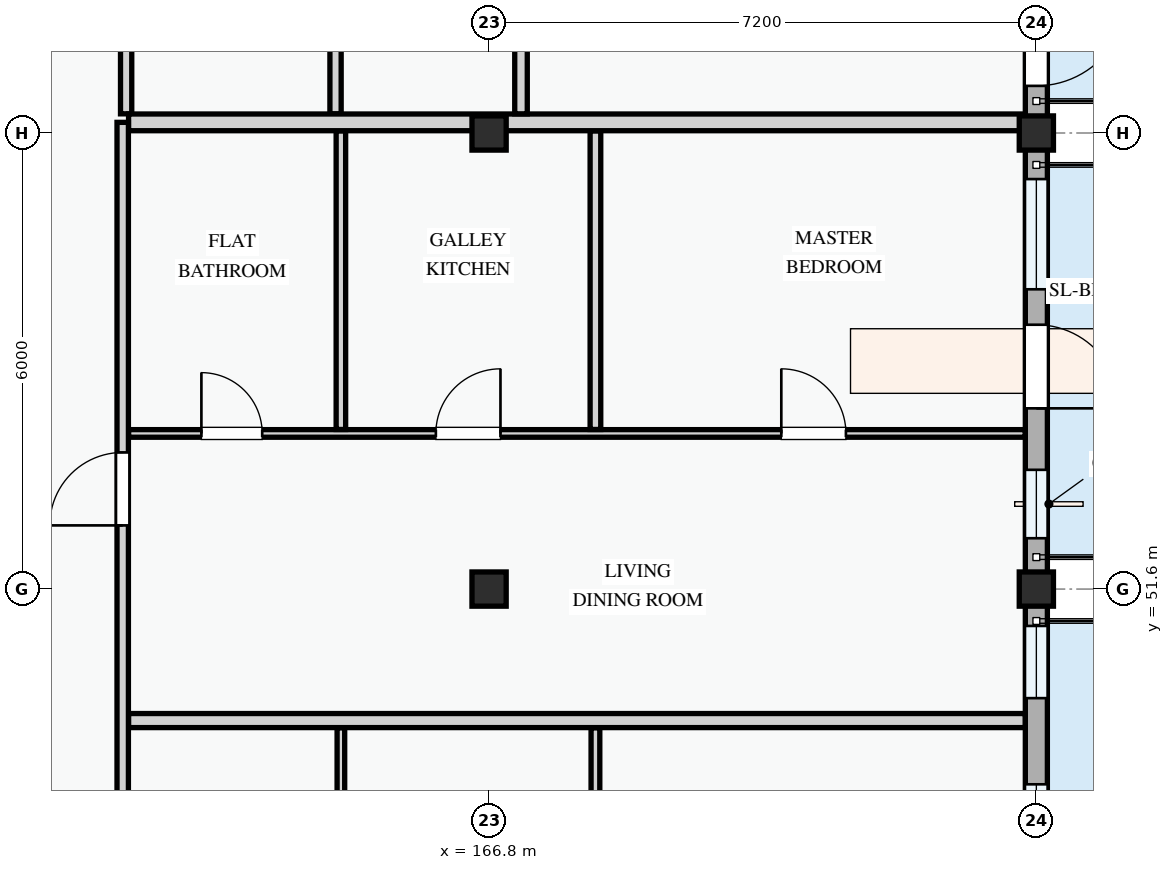
"""IFC4 building model, lengths in metres.
Left out: names, types, materials, properties, quantities, classifications, styles, units other than length and angle.
Written with IfcOpenShell. Run it as: python <this file> out.ifc"""

import sys

from ifc_helpers import new_model, si_unit, direction, frame, frame_2d, origin, origin_2d, place, context, subcontext, project, spatial, rectangle, extrude, element, fill, save


model = new_model("IFC4")
c1 = context("Model", 3, precision=1e-05, world=origin(), true_north=direction((0.0, 1.0)))
c2 = subcontext(c1, "Body", "Model", "MODEL_VIEW")
j1 = project(units=[si_unit("LENGTHUNIT", "METRE"), si_unit("PLANEANGLEUNIT", "RADIAN")], contexts=[c1])
p1 = place(None, origin())
s1 = spatial("IfcSite", under=j1, at=p1, CompositionType="ELEMENT")
p2 = place(p1, origin())
s2 = spatial("IfcBuilding", under=s1, at=p2, CompositionType="ELEMENT")
p3 = place(p2, frame((0.0, 0.0, 18.0)))
s3 = spatial("IfcBuildingStorey", under=s2, at=p3, CompositionType="ELEMENT", Elevation=18.0)
for number, where, z_axis, x_axis in (
    (1, (166.8, 51.6, 0.0), (0.0, 0.0, 1.0), (1.0, 0.0, 0.0)),
    (2, (166.8, 57.6, 0.0), (0.0, 0.0, 1.0), (1.0, 0.0, 0.0)),
    (3, (174.0, 51.6, 0.0), (0.0, 0.0, 1.0), (1.0, 0.0, 0.0)),
    (4, (174.0, 57.6, 0.0), (0.0, 0.0, 1.0), (1.0, 0.0, 0.0)),
):
    element("IfcColumn", number, at=place(p3, frame(where, z_axis=z_axis, x_axis=x_axis)), inside=s3, PredefinedType="COLUMN", context=c2, shape_type="SweptSolid", body=[
        extrude(rectangle(XDim=0.45, YDim=0.45, at=origin_2d()), origin(), (0.0, 0.0, 1.0), 3.3),
    ])
p4 = place(p3, frame((174.0, 43.2, 0.0), z_axis=(0.0, 0.0, 1.0), x_axis=(0.0, 1.0, 0.0)))
e5 = element("IfcWall", 5, at=p4, inside=s3, PredefinedType="STANDARD", context=c2, shape_type="SweptSolid", body=[
    extrude(rectangle(XDim=8.4, YDim=0.29, at=frame_2d((4.2, 0.0))), origin(), (0.0, 0.0, 1.0), 2.425),
])
p5 = place(p4, frame((2.143, 0.0, 0.0)))
e6 = element("IfcOpeningElement", 6, at=p5, cuts=e5, PredefinedType="OPENING", context=c2, shape_type="SweptSolid", body=[
    extrude(rectangle(XDim=1.05, YDim=2.15, at=frame_2d((0.525, 1.075))), frame((0.0, 0.155, 0.0), z_axis=(0.0, -1.0, 0.0), x_axis=(1.0, 0.0, 0.0)), (0.0, 0.0, 1.0), 0.31),
])
p6 = place(p4, frame((0.501, 0.0, 0.78)))
e7 = element("IfcOpeningElement", 7, at=p6, cuts=e5, PredefinedType="OPENING", context=c2, shape_type="SweptSolid", body=[
    extrude(rectangle(XDim=1.0, YDim=1.25, at=frame_2d((0.5, 0.625))), frame((0.0, 0.155, 0.0), z_axis=(0.0, -1.0, 0.0), x_axis=(1.0, 0.0, 0.0)), (0.0, 0.0, 1.0), 0.31),
])
p7 = place(p4, frame((4.081, 0.0, 0.78)))
e8 = element("IfcOpeningElement", 8, at=p7, cuts=e5, PredefinedType="OPENING", context=c2, shape_type="SweptSolid", body=[
    extrude(rectangle(XDim=1.75, YDim=1.45, at=frame_2d((0.875, 0.725))), frame((0.0, 0.155, 0.0), z_axis=(0.0, -1.0, 0.0), x_axis=(1.0, 0.0, 0.0)), (0.0, 0.0, 1.0), 0.31),
])
p8 = place(p4, frame((6.965, 0.0, 0.78)))
e9 = element("IfcOpeningElement", 9, at=p8, cuts=e5, PredefinedType="OPENING", context=c2, shape_type="SweptSolid", body=[
    extrude(rectangle(XDim=0.95, YDim=1.15, at=frame_2d((0.475, 0.575))), frame((0.0, 0.155, 0.0), z_axis=(0.0, -1.0, 0.0), x_axis=(1.0, 0.0, 0.0)), (0.0, 0.0, 1.0), 0.31),
])
p9 = place(p3, frame((174.0, 51.6, 0.0), z_axis=(0.0, 0.0, 1.0), x_axis=(0.0, 1.0, 0.0)))
e10 = element("IfcWall", 10, at=p9, inside=s3, PredefinedType="STANDARD", context=c2, shape_type="SweptSolid", body=[
    extrude(rectangle(XDim=6.0, YDim=0.29, at=frame_2d((3.0, 0.0))), origin(), (0.0, 0.0, 1.0), 2.575),
])
p10 = place(p9, frame((2.378, 0.0, 0.0)))
e11 = element("IfcOpeningElement", 11, at=p10, cuts=e10, PredefinedType="OPENING", context=c2, shape_type="SweptSolid", body=[
    extrude(rectangle(XDim=1.1, YDim=2.15, at=frame_2d((0.55, 1.075))), frame((0.0, 0.155, 0.0), z_axis=(0.0, -1.0, 0.0), x_axis=(1.0, 0.0, 0.0)), (0.0, 0.0, 1.0), 0.31),
])
p11 = place(p9, frame((0.669, 0.0, 0.78)))
e12 = element("IfcOpeningElement", 12, at=p11, cuts=e10, PredefinedType="OPENING", context=c2, shape_type="SweptSolid", body=[
    extrude(rectangle(XDim=0.9, YDim=1.2, at=frame_2d((0.45, 0.6))), frame((0.0, 0.155, 0.0), z_axis=(0.0, -1.0, 0.0), x_axis=(1.0, 0.0, 0.0)), (0.0, 0.0, 1.0), 0.31),
])
p12 = place(p9, frame((3.944, 0.0, 0.78)))
e13 = element("IfcOpeningElement", 13, at=p12, cuts=e10, PredefinedType="OPENING", context=c2, shape_type="SweptSolid", body=[
    extrude(rectangle(XDim=1.45, YDim=1.6, at=frame_2d((0.725, 0.8))), frame((0.0, 0.155, 0.0), z_axis=(0.0, -1.0, 0.0), x_axis=(1.0, 0.0, 0.0)), (0.0, 0.0, 1.0), 0.31),
])
p13 = place(p3, frame((174.0, 57.6, 0.0), z_axis=(0.0, 0.0, 1.0), x_axis=(0.0, 1.0, 0.0)))
e14 = element("IfcWall", 14, at=p13, inside=s3, PredefinedType="STANDARD", context=c2, shape_type="SweptSolid", body=[
    extrude(rectangle(XDim=8.4, YDim=0.29, at=frame_2d((4.2, 0.0))), origin(), (0.0, 0.0, 1.0), 2.425),
])
p14 = place(p13, frame((0.62, 0.0, 0.0)))
e15 = element("IfcOpeningElement", 15, at=p14, cuts=e14, PredefinedType="OPENING", context=c2, shape_type="SweptSolid", body=[
    extrude(rectangle(XDim=1.2, YDim=2.15, at=frame_2d((0.6, 1.075))), frame((0.0, 0.155, 0.0), z_axis=(0.0, -1.0, 0.0), x_axis=(1.0, 0.0, 0.0)), (0.0, 0.0, 1.0), 0.31),
])
p15 = place(p13, frame((2.49, 0.0, 0.78)))
e16 = element("IfcOpeningElement", 16, at=p15, cuts=e14, PredefinedType="OPENING", context=c2, shape_type="SweptSolid", body=[
    extrude(rectangle(XDim=2.0, YDim=1.5, at=frame_2d((1.0, 0.75))), frame((0.0, 0.155, 0.0), z_axis=(0.0, -1.0, 0.0), x_axis=(1.0, 0.0, 0.0)), (0.0, 0.0, 1.0), 0.31),
])
p16 = place(p13, frame((5.93, 0.0, 0.78)))
e17 = element("IfcOpeningElement", 17, at=p16, cuts=e14, PredefinedType="OPENING", context=c2, shape_type="SweptSolid", body=[
    extrude(rectangle(XDim=1.32, YDim=1.35, at=frame_2d((0.66, 0.675))), frame((0.0, 0.155, 0.0), z_axis=(0.0, -1.0, 0.0), x_axis=(1.0, 0.0, 0.0)), (0.0, 0.0, 1.0), 0.31),
])
for number, where, z_axis, x_axis in (
    (18, (162.025, 61.724, 0.0), (0.0, 0.0, 1.0), (0.0, -1.0, 0.0)),
    (19, (164.78, 61.724, 0.0), (0.0, 0.0, 1.0), (0.0, -1.0, 0.0)),
):
    element("IfcWall", number, at=place(p3, frame(where, z_axis=z_axis, x_axis=x_axis)), inside=s3, PredefinedType="PARTITIONING", context=c2, shape_type="SweptSolid", body=[
        extrude(rectangle(XDim=3.872, YDim=0.148, at=frame_2d((1.936, 0.0))), origin(), (0.0, 0.0, 1.0), 3.0),
    ])
p17 = place(p3, frame((168.199, 45.077, 0.0), z_axis=(0.0, 0.0, 1.0), x_axis=(0.0, 1.0, 0.0)))
e20 = element("IfcWall", 20, at=p17, inside=s3, PredefinedType="PARTITIONING", context=c2, shape_type="SweptSolid", body=[
    extrude(rectangle(XDim=4.698, YDim=0.115, at=frame_2d((2.349, 0.0))), origin(), (0.0, 0.0, 1.0), 3.0),
])
p18 = place(p3, frame((164.85, 45.077, 0.0), z_axis=(0.0, 0.0, 1.0), x_axis=(0.0, 1.0, 0.0)))
e21 = element("IfcWall", 21, at=p18, inside=s3, PredefinedType="PARTITIONING", context=c2, shape_type="SweptSolid", body=[
    extrude(rectangle(XDim=4.698, YDim=0.1, at=frame_2d((2.349, 0.0))), origin(), (0.0, 0.0, 1.0), 3.0),
])
p19 = place(p3, frame((162.057, 53.648, 0.0), z_axis=(0.0, 0.0, 1.0), x_axis=(1.0, 0.0, 0.0)))
e22 = element("IfcWall", 22, at=p19, inside=s3, PredefinedType="PARTITIONING", context=c2, shape_type="SweptSolid", body=[
    extrude(rectangle(XDim=11.796, YDim=0.1, at=frame_2d((5.898, 0.0))), origin(), (0.0, 0.0, 1.0), 3.0),
])
p20 = place(p19, frame((0.958, 0.0, 0.0)))
e23 = element("IfcOpeningElement", 23, at=p20, cuts=e22, PredefinedType="OPENING", context=c2, shape_type="SweptSolid", body=[
    extrude(rectangle(XDim=0.8, YDim=2.1, at=frame_2d((0.4, 1.05))), frame((0.0, 0.06, 0.0), z_axis=(0.0, -1.0, 0.0), x_axis=(1.0, 0.0, 0.0)), (0.0, 0.0, 1.0), 0.12),
])
p21 = place(p19, frame((4.043, 0.0, 0.0)))
e24 = element("IfcOpeningElement", 24, at=p21, cuts=e22, PredefinedType="OPENING", context=c2, shape_type="SweptSolid", body=[
    extrude(rectangle(XDim=0.85, YDim=2.1, at=frame_2d((0.425, 1.05))), frame((0.0, 0.06, 0.0), z_axis=(0.0, -1.0, 0.0), x_axis=(1.0, 0.0, 0.0)), (0.0, 0.0, 1.0), 0.12),
])
p22 = place(p19, frame((8.588, 0.0, 0.0)))
e25 = element("IfcOpeningElement", 25, at=p22, cuts=e22, PredefinedType="OPENING", context=c2, shape_type="SweptSolid", body=[
    extrude(rectangle(XDim=0.85, YDim=2.1, at=frame_2d((0.425, 1.05))), frame((0.0, 0.06, 0.0), z_axis=(0.0, -1.0, 0.0), x_axis=(1.0, 0.0, 0.0)), (0.0, 0.0, 1.0), 0.12),
])
p23 = place(p3, frame((168.199, 53.7, 0.0), z_axis=(0.0, 0.0, 1.0), x_axis=(0.0, 1.0, 0.0)))
e26 = element("IfcWall", 26, at=p23, inside=s3, PredefinedType="PARTITIONING", context=c2, shape_type="SweptSolid", body=[
    extrude(rectangle(XDim=3.928, YDim=0.14, at=frame_2d((1.964, 0.0))), origin(), (0.0, 0.0, 1.0), 3.0),
])
p24 = place(p3, frame((164.85, 53.7, 0.0), z_axis=(0.0, 0.0, 1.0), x_axis=(0.0, 1.0, 0.0)))
e27 = element("IfcWall", 27, at=p24, inside=s3, PredefinedType="PARTITIONING", context=c2, shape_type="SweptSolid", body=[
    extrude(rectangle(XDim=3.928, YDim=0.125, at=frame_2d((1.964, 0.0))), origin(), (0.0, 0.0, 1.0), 3.0),
])
p25 = place(p3, frame((162.057, 49.87, 0.0), z_axis=(0.0, 0.0, 1.0), x_axis=(1.0, 0.0, 0.0)))
e28 = element("IfcWall", 28, at=p25, inside=s3, PredefinedType="PARTITIONING", context=c2, shape_type="SweptSolid", body=[
    extrude(rectangle(XDim=11.796, YDim=0.185, at=frame_2d((5.898, 0.0))), origin(), (0.0, 0.0, 1.0), 3.0),
])
p26 = place(p3, frame((162.057, 57.74, 0.0), z_axis=(0.0, 0.0, 1.0), x_axis=(1.0, 0.0, 0.0)))
e29 = element("IfcWall", 29, at=p26, inside=s3, PredefinedType="PARTITIONING", context=c2, shape_type="SweptSolid", body=[
    extrude(rectangle(XDim=11.796, YDim=0.22, at=frame_2d((5.898, 0.0))), origin(), (0.0, 0.0, 1.0), 2.375),
])
p27 = place(p3, frame((161.98, 37.347, 0.0), z_axis=(0.0, 0.0, 1.0), x_axis=(0.0, 1.0, 0.0)))
e30 = element("IfcWall", 30, at=p27, inside=s3, PredefinedType="PARTITIONING", context=c2, shape_type="SweptSolid", body=[
    extrude(rectangle(XDim=20.393, YDim=0.15, at=frame_2d((10.197, 0.0))), origin(), (0.0, 0.0, 1.0), 3.0),
])
p28 = place(p27, frame((2.326, 0.0, 0.0)))
e31 = element("IfcOpeningElement", 31, at=p28, cuts=e30, PredefinedType="OPENING", context=c2, shape_type="SweptSolid", body=[
    extrude(rectangle(XDim=0.92, YDim=2.1, at=frame_2d((0.46, 1.05))), frame((0.0, 0.085, 0.0), z_axis=(0.0, -1.0, 0.0), x_axis=(1.0, 0.0, 0.0)), (0.0, 0.0, 1.0), 0.17),
])
p29 = place(p27, frame((15.091, 0.0, 0.0)))
e32 = element("IfcOpeningElement", 32, at=p29, cuts=e30, PredefinedType="OPENING", context=c2, shape_type="SweptSolid", body=[
    extrude(rectangle(XDim=0.96, YDim=2.12, at=frame_2d((0.48, 1.06))), frame((0.0, 0.085, 0.0), z_axis=(0.0, -1.0, 0.0), x_axis=(1.0, 0.0, 0.0)), (0.0, 0.0, 1.0), 0.17),
])
p30 = place(p3, frame((167.22, 57.852, 0.0), z_axis=(0.0, 0.0, 1.0), x_axis=(0.0, 1.0, 0.0)))
e33 = element("IfcWall", 33, at=p30, inside=s3, PredefinedType="PARTITIONING", context=c2, shape_type="SweptSolid", body=[
    extrude(rectangle(XDim=14.008, YDim=0.165, at=frame_2d((7.004, 0.0))), origin(), (0.0, 0.0, 1.0), 2.425),
])
p31 = place(p30, frame((2.438, 0.0, 0.0)))
e34 = element("IfcOpeningElement", 34, at=p31, cuts=e33, PredefinedType="OPENING", context=c2, shape_type="SweptSolid", body=[
    extrude(rectangle(XDim=0.92, YDim=2.1, at=frame_2d((0.46, 1.05))), frame((0.0, 0.093, 0.0), z_axis=(0.0, -1.0, 0.0), x_axis=(1.0, 0.0, 0.0)), (0.0, 0.0, 1.0), 0.185),
])
p32 = place(p7, origin())
e35 = element("IfcWindow", 35, at=p32, inside=s3, PartitioningType="DOUBLE_PANEL_VERTICAL", PredefinedType="WINDOW", context=c2, shape_type="SweptSolid", body=[
    extrude(rectangle(XDim=1.75, YDim=1.45, at=frame_2d((0.875, 0.725))), frame((0.0, 0.03, 0.0), z_axis=(0.0, -1.0, 0.0), x_axis=(1.0, 0.0, 0.0)), (0.0, 0.0, 1.0), 0.06),
])
fill(e8, e35)
p33 = place(p8, origin())
e36 = element("IfcWindow", 36, at=p33, inside=s3, PartitioningType="SINGLE_PANEL", PredefinedType="WINDOW", context=c2, shape_type="SweptSolid", body=[
    extrude(rectangle(XDim=0.95, YDim=1.15, at=frame_2d((0.475, 0.575))), frame((0.0, 0.03, 0.0), z_axis=(0.0, -1.0, 0.0), x_axis=(1.0, 0.0, 0.0)), (0.0, 0.0, 1.0), 0.06),
])
fill(e9, e36)
p34 = place(p10, frame((1.1, 0.0, 0.0), z_axis=(0.0, 0.0, 1.0), x_axis=(-1.0, 0.0, 0.0)))
e37 = element("IfcDoor", 37, at=p34, inside=s3, OperationType="SINGLE_SWING_RIGHT", PredefinedType="DOOR", context=c2, shape_type="SweptSolid", body=[
    extrude(rectangle(XDim=1.1, YDim=2.15, at=frame_2d((0.55, 1.075))), frame((0.0, 0.025, 0.0), z_axis=(0.0, -1.0, 0.0), x_axis=(1.0, 0.0, 0.0)), (0.0, 0.0, 1.0), 0.05),
])
fill(e11, e37)
p35 = place(p11, origin())
e38 = element("IfcWindow", 38, at=p35, inside=s3, PartitioningType="SINGLE_PANEL", PredefinedType="WINDOW", context=c2, shape_type="SweptSolid", body=[
    extrude(rectangle(XDim=0.9, YDim=1.2, at=frame_2d((0.45, 0.6))), frame((0.0, 0.03, 0.0), z_axis=(0.0, -1.0, 0.0), x_axis=(1.0, 0.0, 0.0)), (0.0, 0.0, 1.0), 0.06),
])
fill(e12, e38)
p36 = place(p12, origin())
e39 = element("IfcWindow", 39, at=p36, inside=s3, PartitioningType="SINGLE_PANEL", PredefinedType="WINDOW", context=c2, shape_type="SweptSolid", body=[
    extrude(rectangle(XDim=1.45, YDim=1.6, at=frame_2d((0.725, 0.8))), frame((0.0, 0.03, 0.0), z_axis=(0.0, -1.0, 0.0), x_axis=(1.0, 0.0, 0.0)), (0.0, 0.0, 1.0), 0.06),
])
fill(e13, e39)
p37 = place(p14, frame((1.2, 0.0, 0.0), z_axis=(0.0, 0.0, 1.0), x_axis=(-1.0, 0.0, 0.0)))
e40 = element("IfcDoor", 40, at=p37, inside=s3, OperationType="SINGLE_SWING_LEFT", PredefinedType="DOOR", context=c2, shape_type="SweptSolid", body=[
    extrude(rectangle(XDim=1.2, YDim=2.15, at=frame_2d((0.6, 1.075))), frame((0.0, 0.025, 0.0), z_axis=(0.0, -1.0, 0.0), x_axis=(1.0, 0.0, 0.0)), (0.0, 0.0, 1.0), 0.05),
])
fill(e15, e40)
p38 = place(p20, origin())
e41 = element("IfcDoor", 41, at=p38, inside=s3, OperationType="SINGLE_SWING_LEFT", PredefinedType="DOOR", context=c2, shape_type="SweptSolid", body=[
    extrude(rectangle(XDim=0.8, YDim=2.1, at=frame_2d((0.4, 1.05))), frame((0.0, 0.025, 0.0), z_axis=(0.0, -1.0, 0.0), x_axis=(1.0, 0.0, 0.0)), (0.0, 0.0, 1.0), 0.05),
])
fill(e23, e41)
p39 = place(p21, origin())
e42 = element("IfcDoor", 42, at=p39, inside=s3, OperationType="SINGLE_SWING_RIGHT", PredefinedType="DOOR", context=c2, shape_type="SweptSolid", body=[
    extrude(rectangle(XDim=0.85, YDim=2.1, at=frame_2d((0.425, 1.05))), frame((0.0, 0.025, 0.0), z_axis=(0.0, -1.0, 0.0), x_axis=(1.0, 0.0, 0.0)), (0.0, 0.0, 1.0), 0.05),
])
fill(e24, e42)
p40 = place(p22, origin())
e43 = element("IfcDoor", 43, at=p40, inside=s3, OperationType="SINGLE_SWING_LEFT", PredefinedType="DOOR", context=c2, shape_type="SweptSolid", body=[
    extrude(rectangle(XDim=0.85, YDim=2.1, at=frame_2d((0.425, 1.05))), frame((0.0, 0.025, 0.0), z_axis=(0.0, -1.0, 0.0), x_axis=(1.0, 0.0, 0.0)), (0.0, 0.0, 1.0), 0.05),
])
fill(e25, e43)
p41 = place(p29, origin())
e44 = element("IfcDoor", 44, at=p41, inside=s3, OperationType="SINGLE_SWING_LEFT", PredefinedType="DOOR", context=c2, shape_type="SweptSolid", body=[
    extrude(rectangle(XDim=0.96, YDim=2.12, at=frame_2d((0.48, 1.06))), frame((0.0, 0.025, 0.0), z_axis=(0.0, -1.0, 0.0), x_axis=(1.0, 0.0, 0.0)), (0.0, 0.0, 1.0), 0.05),
])
fill(e32, e44)
save(model, sys.argv[1])
